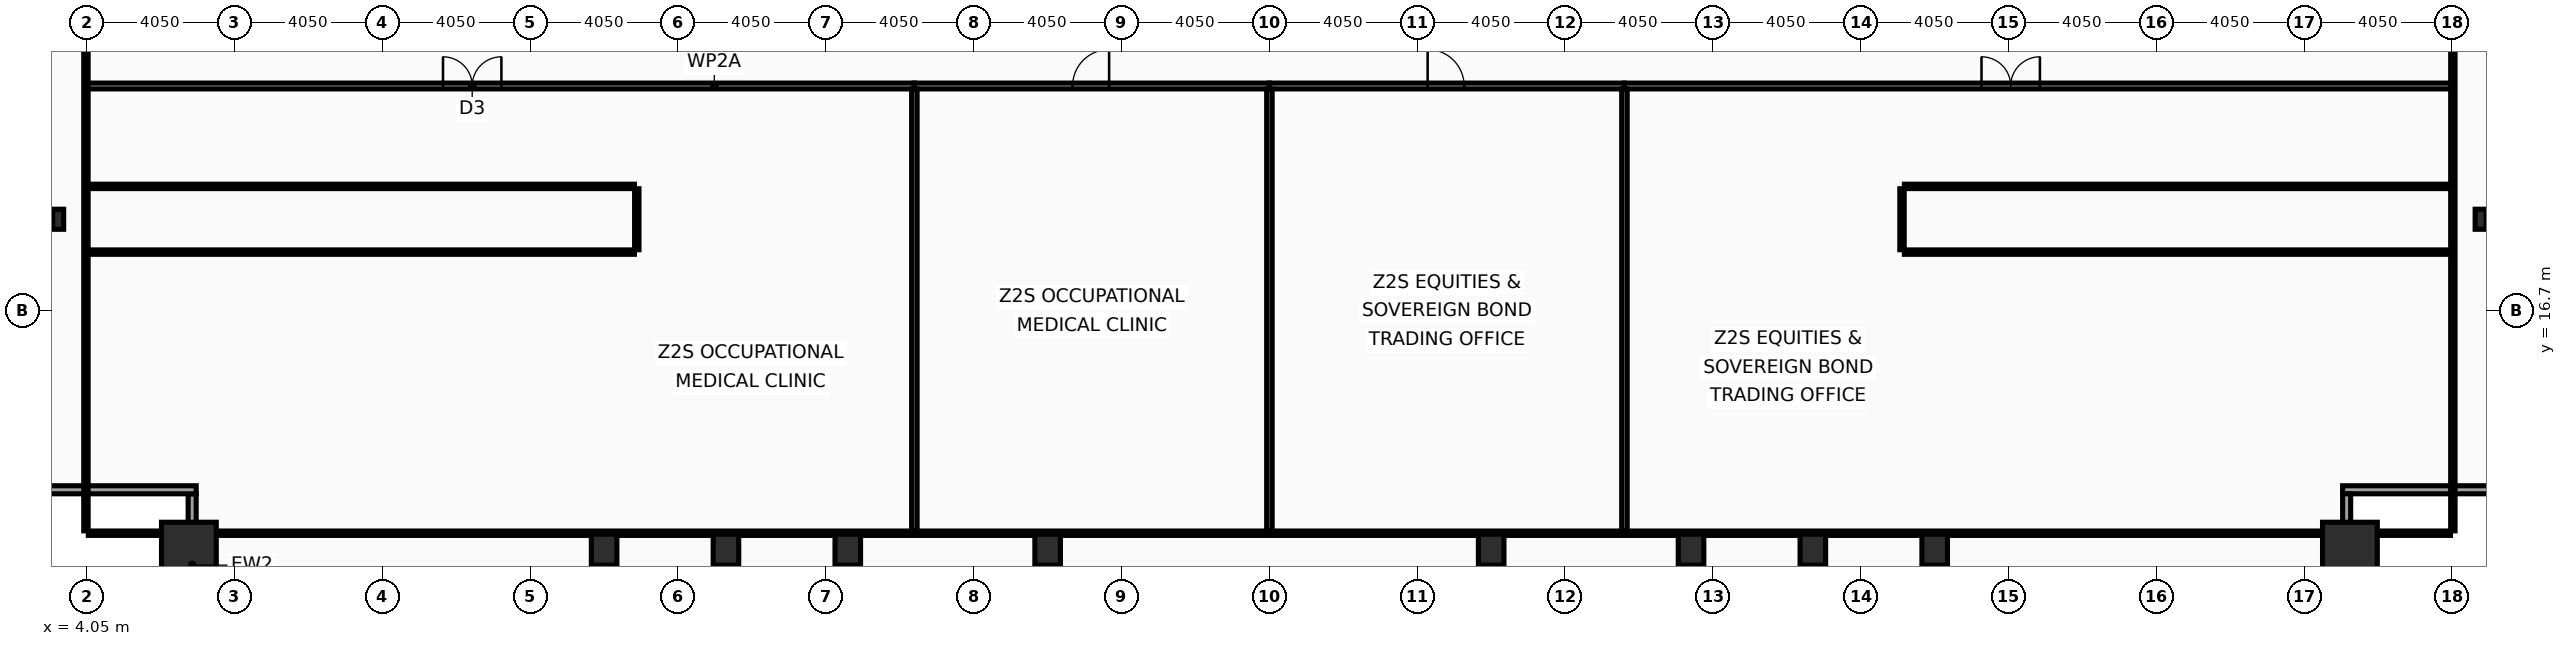
"""IFC4 building model, lengths in metres.
Left out: names, types, materials, properties, quantities, classifications, styles, units other than length and angle.
Written with IfcOpenShell. Run it as: python <this file> out.ifc"""

import sys

from ifc_helpers import new_model, si_unit, direction, frame, frame_2d, origin, origin_2d, place, context, subcontext, project, spatial, rectangle, hollow_rectangle, i_section, extrude, element, fill, save


model = new_model("IFC4")
c1 = context("Model", 3, precision=1e-05, world=origin(), true_north=direction((0.0, 1.0)))
c2 = subcontext(c1, "Body", "Model", "MODEL_VIEW")
j1 = project(units=[si_unit("LENGTHUNIT", "METRE"), si_unit("PLANEANGLEUNIT", "RADIAN")], contexts=[c1])
p1 = place(None, origin())
s1 = spatial("IfcSite", under=j1, at=p1, CompositionType="ELEMENT")
p2 = place(p1, origin())
s2 = spatial("IfcBuilding", under=s1, at=p2, CompositionType="ELEMENT")
p3 = place(p2, frame((0.0, 0.0, 132.6)))
s3 = spatial("IfcBuildingStorey", under=s2, at=p3, CompositionType="ELEMENT", Elevation=132.6)
for number, where, z_axis, x_axis in (
    (1, (6.85, 10.15, 0.0), (0.0, 0.0, 1.0), (1.0, 0.0, 0.0)),
    (2, (66.05, 10.15, 0.0), (0.0, 0.0, 1.0), (1.0, 0.0, 0.0)),
):
    element("IfcColumn", number, at=place(p3, frame(where, z_axis=z_axis, x_axis=x_axis)), inside=s3, PredefinedType="COLUMN", context=c2, shape_type="SweptSolid", body=[
        extrude(hollow_rectangle(XDim=1.5, YDim=1.5, WallThickness=0.07, at=origin_2d()), origin(), (0.0, 0.0, 1.0), 3.6),
    ])
for number, where, z_axis, x_axis in (
    (3, (18.225, 10.15, 0.0), (0.0, 0.0, 1.0), (1.0, 0.0, 0.0)),
    (4, (21.562, 10.15, 0.0), (0.0, 0.0, 1.0), (1.0, 0.0, 0.0)),
    (5, (24.9, 10.15, 0.0), (0.0, 0.0, 1.0), (1.0, 0.0, 0.0)),
    (6, (30.375, 10.15, 0.0), (0.0, 0.0, 1.0), (1.0, 0.0, 0.0)),
    (7, (42.525, 10.15, 0.0), (0.0, 0.0, 1.0), (1.0, 0.0, 0.0)),
    (8, (48.0, 10.15, 0.0), (0.0, 0.0, 1.0), (1.0, 0.0, 0.0)),
    (9, (51.337, 10.15, 0.0), (0.0, 0.0, 1.0), (1.0, 0.0, 0.0)),
    (10, (54.675, 10.15, 0.0), (0.0, 0.0, 1.0), (1.0, 0.0, 0.0)),
):
    element("IfcColumn", number, at=place(p3, frame(where, z_axis=z_axis, x_axis=x_axis)), inside=s3, PredefinedType="COLUMN", context=c2, shape_type="SweptSolid", body=[
        extrude(hollow_rectangle(XDim=0.7, YDim=0.85, WallThickness=0.05, at=origin_2d()), origin(), (0.0, 0.0, 1.0), 3.6),
    ])
for number, where, z_axis, x_axis in (
    (11, (3.27, 19.2, 0.0), (0.0, 0.0, 1.0), (1.0, 0.0, 0.0)),
    (12, (69.63, 19.2, 0.0), (0.0, 0.0, 1.0), (1.0, 0.0, 0.0)),
):
    element("IfcColumn", number, at=place(p3, frame(where, z_axis=z_axis, x_axis=x_axis)), inside=s3, PredefinedType="COLUMN", context=c2, shape_type="SweptSolid", body=[
        extrude(i_section(OverallWidth=0.3, OverallDepth=0.55, WebThickness=0.015, FlangeThickness=0.029, at=origin_2d()), origin(), (0.0, 0.0, 1.0), 3.6),
    ])
p4 = place(p3, frame((6.94, 7.77, 0.0), z_axis=(0.0, 0.0, 1.0), x_axis=(0.0, 1.0, 0.0)))
e13 = element("IfcWall", 13, at=p4, inside=s3, PredefinedType="SOLIDWALL", context=c2, shape_type="SweptSolid", body=[
    extrude(rectangle(XDim=3.91, YDim=0.22, at=frame_2d((1.955, 0.0))), origin(), (0.0, 0.0, 1.0), 2.09),
])
p5 = place(p3, frame((7.05, 11.79, 0.0), z_axis=(0.0, 0.0, 1.0), x_axis=(-1.0, 0.0, 0.0)))
e14 = element("IfcWall", 14, at=p5, inside=s3, PredefinedType="SOLIDWALL", context=c2, shape_type="SweptSolid", body=[
    extrude(rectangle(XDim=4.13, YDim=0.22, at=frame_2d((2.065, 0.0))), origin(), (0.0, 0.0, 1.0), 2.83),
])
p6 = place(p3, frame((69.98, 11.79, 0.0), z_axis=(0.0, 0.0, 1.0), x_axis=(-1.0, 0.0, 0.0)))
e15 = element("IfcWall", 15, at=p6, inside=s3, PredefinedType="SOLIDWALL", context=c2, shape_type="SweptSolid", body=[
    extrude(rectangle(XDim=4.13, YDim=0.22, at=frame_2d((2.065, 0.0))), origin(), (0.0, 0.0, 1.0), 2.83),
])
p7 = place(p3, frame((65.96, 11.68, 0.0), z_axis=(0.0, 0.0, 1.0), x_axis=(0.0, -1.0, 0.0)))
e16 = element("IfcWall", 16, at=p7, inside=s3, PredefinedType="SOLIDWALL", context=c2, shape_type="SweptSolid", body=[
    extrude(rectangle(XDim=3.91, YDim=0.22, at=frame_2d((1.955, 0.0))), origin(), (0.0, 0.0, 1.0), 2.09),
])
p8 = place(p3, frame((4.03, 22.85, 0.0), z_axis=(0.0, 0.0, 1.0), x_axis=(1.0, 0.0, 0.0)))
e17 = element("IfcWall", 17, at=p8, inside=s3, PredefinedType="PARTITIONING", context=c2, shape_type="SweptSolid", body=[
    extrude(rectangle(XDim=22.694, YDim=0.16, at=frame_2d((11.347, 0.0))), origin(), (0.0, 0.0, 1.0), 2.53),
])
p9 = place(p8, frame((9.781, 0.0, 0.0)))
e18 = element("IfcOpeningElement", 18, at=p9, cuts=e17, PredefinedType="OPENING", context=c2, shape_type="SweptSolid", body=[
    extrude(rectangle(XDim=1.6, YDim=2.15, at=frame_2d((0.8, 1.075))), frame((0.0, 0.09, 0.0), z_axis=(0.0, -1.0, 0.0), x_axis=(1.0, 0.0, 0.0)), (0.0, 0.0, 1.0), 0.18),
])
p10 = place(p3, frame((26.724, 22.85, 0.0), z_axis=(0.0, 0.0, 1.0), x_axis=(1.0, 0.0, 0.0)))
e19 = element("IfcWall", 19, at=p10, inside=s3, PredefinedType="PARTITIONING", context=c2, shape_type="SweptSolid", body=[
    extrude(rectangle(XDim=9.726, YDim=0.16, at=frame_2d((4.863, 0.0))), origin(), (0.0, 0.0, 1.0), 2.73),
])
p11 = place(p10, frame((4.335, 0.0, 0.0)))
e20 = element("IfcOpeningElement", 20, at=p11, cuts=e19, PredefinedType="OPENING", context=c2, shape_type="SweptSolid", body=[
    extrude(rectangle(XDim=1.0, YDim=2.05, at=frame_2d((0.5, 1.025))), frame((0.0, 0.09, 0.0), z_axis=(0.0, -1.0, 0.0), x_axis=(1.0, 0.0, 0.0)), (0.0, 0.0, 1.0), 0.18),
])
p12 = place(p3, frame((26.724, 10.665, 0.0), z_axis=(0.0, 0.0, 1.0), x_axis=(0.0, 1.0, 0.0)))
e21 = element("IfcWall", 21, at=p12, inside=s3, PredefinedType="PARTITIONING", context=c2, shape_type="SweptSolid", body=[
    extrude(rectangle(XDim=12.1, YDim=0.15, at=frame_2d((6.05, 0.0))), origin(), (0.0, 0.0, 1.0), 2.93),
])
p13 = place(p3, frame((36.45, 22.85, 0.0), z_axis=(0.0, 0.0, 1.0), x_axis=(1.0, 0.0, 0.0)))
e22 = element("IfcWall", 22, at=p13, inside=s3, PredefinedType="PARTITIONING", context=c2, shape_type="SweptSolid", body=[
    extrude(rectangle(XDim=9.726, YDim=0.16, at=frame_2d((4.863, 0.0))), origin(), (0.0, 0.0, 1.0), 2.73),
])
p14 = place(p13, frame((4.335, 0.0, 0.0)))
e23 = element("IfcOpeningElement", 23, at=p14, cuts=e22, PredefinedType="OPENING", context=c2, shape_type="SweptSolid", body=[
    extrude(rectangle(XDim=1.0, YDim=2.05, at=frame_2d((0.5, 1.025))), frame((0.0, 0.09, 0.0), z_axis=(0.0, -1.0, 0.0), x_axis=(1.0, 0.0, 0.0)), (0.0, 0.0, 1.0), 0.18),
])
p15 = place(p3, frame((36.45, 10.665, 0.0), z_axis=(0.0, 0.0, 1.0), x_axis=(0.0, 1.0, 0.0)))
e24 = element("IfcWall", 24, at=p15, inside=s3, PredefinedType="PARTITIONING", context=c2, shape_type="SweptSolid", body=[
    extrude(rectangle(XDim=12.1, YDim=0.15, at=frame_2d((6.05, 0.0))), origin(), (0.0, 0.0, 1.0), 2.93),
])
p16 = place(p3, frame((46.176, 22.85, 0.0), z_axis=(0.0, 0.0, 1.0), x_axis=(1.0, 0.0, 0.0)))
e25 = element("IfcWall", 25, at=p16, inside=s3, PredefinedType="PARTITIONING", context=c2, shape_type="SweptSolid", body=[
    extrude(rectangle(XDim=22.694, YDim=0.16, at=frame_2d((11.347, 0.0))), origin(), (0.0, 0.0, 1.0), 2.53),
])
p17 = place(p16, frame((9.781, 0.0, 0.0)))
e26 = element("IfcOpeningElement", 26, at=p17, cuts=e25, PredefinedType="OPENING", context=c2, shape_type="SweptSolid", body=[
    extrude(rectangle(XDim=1.6, YDim=2.15, at=frame_2d((0.8, 1.075))), frame((0.0, 0.09, 0.0), z_axis=(0.0, -1.0, 0.0), x_axis=(1.0, 0.0, 0.0)), (0.0, 0.0, 1.0), 0.18),
])
p18 = place(p3, frame((46.176, 10.665, 0.0), z_axis=(0.0, 0.0, 1.0), x_axis=(0.0, 1.0, 0.0)))
e27 = element("IfcWall", 27, at=p18, inside=s3, PredefinedType="PARTITIONING", context=c2, shape_type="SweptSolid", body=[
    extrude(rectangle(XDim=12.1, YDim=0.15, at=frame_2d((6.05, 0.0))), origin(), (0.0, 0.0, 1.0), 2.93),
])
for number, where, z_axis, x_axis in (
    (28, (4.03, 10.665, 0.0), (0.0, 0.0, 1.0), (0.0, 1.0, 0.0)),
    (29, (68.87, 10.665, 0.0), (0.0, 0.0, 1.0), (0.0, 1.0, 0.0)),
):
    element("IfcWall", number, at=place(p3, frame(where, z_axis=z_axis, x_axis=x_axis)), inside=s3, PredefinedType="PARTITIONING", context=c2, shape_type="SweptSolid", body=[
        extrude(rectangle(XDim=42.11, YDim=0.12, at=frame_2d((21.055, 0.0))), origin(), (0.0, 0.0, 1.0), 1.83),
    ])
p19 = place(p3, frame((4.095, 10.6, 0.0), z_axis=(0.0, 0.0, 1.0), x_axis=(1.0, 0.0, 0.0)))
e30 = element("IfcWall", 30, at=p19, inside=s3, PredefinedType="PARTITIONING", context=c2, shape_type="SweptSolid", body=[
    extrude(rectangle(XDim=64.71, YDim=0.12, at=frame_2d((32.355, 0.0))), origin(), (0.0, 0.0, 1.0), 2.09),
])
for number, where, z_axis, x_axis in (
    (31, (4.095, 18.3, 0.0), (0.0, 0.0, 1.0), (1.0, 0.0, 0.0)),
    (32, (4.095, 20.1, 0.0), (0.0, 0.0, 1.0), (1.0, 0.0, 0.0)),
):
    element("IfcWall", number, at=place(p3, frame(where, z_axis=z_axis, x_axis=x_axis)), inside=s3, PredefinedType="PARTITIONING", context=c2, shape_type="SweptSolid", body=[
        extrude(rectangle(XDim=14.96, YDim=0.12, at=frame_2d((7.48, 0.0))), origin(), (0.0, 0.0, 1.0), 2.53),
    ])
p20 = place(p3, frame((19.12, 18.365, 0.0), z_axis=(0.0, 0.0, 1.0), x_axis=(0.0, 1.0, 0.0)))
e33 = element("IfcWall", 33, at=p20, inside=s3, PredefinedType="PARTITIONING", context=c2, shape_type="SweptSolid", body=[
    extrude(rectangle(XDim=1.67, YDim=0.12, at=frame_2d((0.835, 0.0))), origin(), (0.0, 0.0, 1.0), 3.44),
])
for number, where, z_axis, x_axis in (
    (34, (53.845, 18.3, 0.0), (0.0, 0.0, 1.0), (1.0, 0.0, 0.0)),
    (35, (53.845, 20.1, 0.0), (0.0, 0.0, 1.0), (1.0, 0.0, 0.0)),
):
    element("IfcWall", number, at=place(p3, frame(where, z_axis=z_axis, x_axis=x_axis)), inside=s3, PredefinedType="PARTITIONING", context=c2, shape_type="SweptSolid", body=[
        extrude(rectangle(XDim=14.96, YDim=0.12, at=frame_2d((7.48, 0.0))), origin(), (0.0, 0.0, 1.0), 2.53),
    ])
p21 = place(p3, frame((53.78, 18.365, 0.0), z_axis=(0.0, 0.0, 1.0), x_axis=(0.0, 1.0, 0.0)))
e36 = element("IfcWall", 36, at=p21, inside=s3, PredefinedType="PARTITIONING", context=c2, shape_type="SweptSolid", body=[
    extrude(rectangle(XDim=1.67, YDim=0.12, at=frame_2d((0.835, 0.0))), origin(), (0.0, 0.0, 1.0), 3.44),
])
p22 = place(p9, origin())
e37 = element("IfcDoor", 37, at=p22, inside=s3, OperationType="DOUBLE_DOOR_SINGLE_SWING", PredefinedType="DOOR", context=c2, shape_type="SweptSolid", body=[
    extrude(rectangle(XDim=1.6, YDim=2.15, at=frame_2d((0.8, 1.075))), frame((0.0, 0.025, 0.0), z_axis=(0.0, -1.0, 0.0), x_axis=(1.0, 0.0, 0.0)), (0.0, 0.0, 1.0), 0.05),
])
fill(e18, e37)
p23 = place(p11, origin())
e38 = element("IfcDoor", 38, at=p23, inside=s3, OperationType="SINGLE_SWING_RIGHT", PredefinedType="DOOR", context=c2, shape_type="SweptSolid", body=[
    extrude(rectangle(XDim=1.0, YDim=2.05, at=frame_2d((0.5, 1.025))), frame((0.0, 0.025, 0.0), z_axis=(0.0, -1.0, 0.0), x_axis=(1.0, 0.0, 0.0)), (0.0, 0.0, 1.0), 0.05),
])
fill(e20, e38)
p24 = place(p14, origin())
e39 = element("IfcDoor", 39, at=p24, inside=s3, OperationType="SINGLE_SWING_LEFT", PredefinedType="DOOR", context=c2, shape_type="SweptSolid", body=[
    extrude(rectangle(XDim=1.0, YDim=2.05, at=frame_2d((0.5, 1.025))), frame((0.0, 0.025, 0.0), z_axis=(0.0, -1.0, 0.0), x_axis=(1.0, 0.0, 0.0)), (0.0, 0.0, 1.0), 0.05),
])
fill(e23, e39)
p25 = place(p17, origin())
e40 = element("IfcDoor", 40, at=p25, inside=s3, OperationType="DOUBLE_DOOR_SINGLE_SWING", PredefinedType="DOOR", context=c2, shape_type="SweptSolid", body=[
    extrude(rectangle(XDim=1.6, YDim=2.15, at=frame_2d((0.8, 1.075))), frame((0.0, 0.025, 0.0), z_axis=(0.0, -1.0, 0.0), x_axis=(1.0, 0.0, 0.0)), (0.0, 0.0, 1.0), 0.05),
])
fill(e26, e40)
save(model, sys.argv[1])
